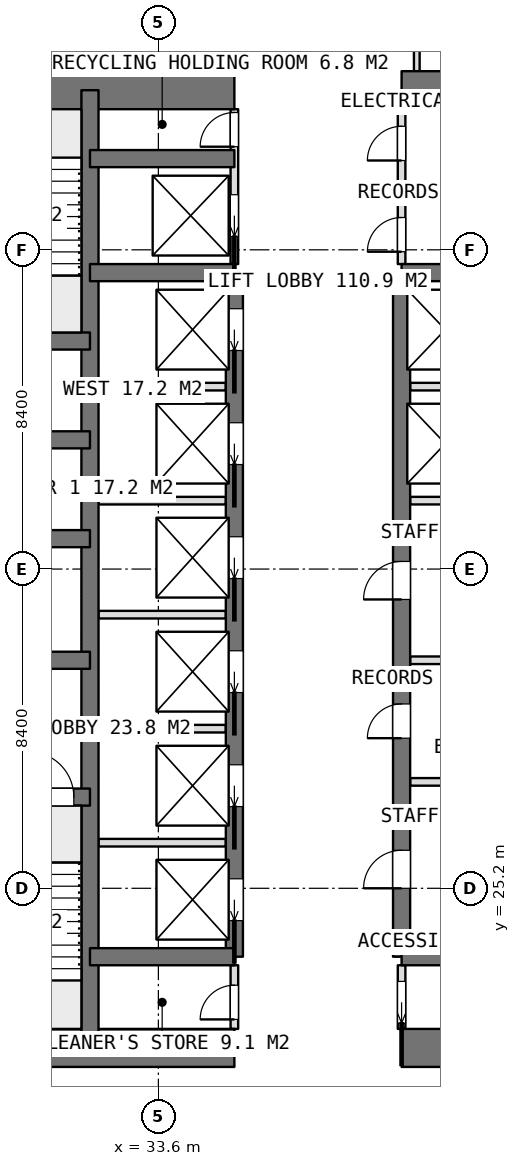
"""IFC4 building model, lengths in metres.
Left out: names, types, materials, properties, quantities, classifications, styles, units other than length and angle.
Written with IfcOpenShell. Run it as: python <this file> out.ifc"""

import sys

from ifc_helpers import new_model, si_unit, direction, frame, frame_2d, origin, place, context, subcontext, project, spatial, rectangle, extrude, element, fill, save


model = new_model("IFC4")
c1 = context("Model", 3, precision=1e-05, world=origin(), true_north=direction((0.0, 1.0)))
c2 = subcontext(c1, "Body", "Model", "MODEL_VIEW")
j1 = project(units=[si_unit("LENGTHUNIT", "METRE"), si_unit("PLANEANGLEUNIT", "RADIAN")], contexts=[c1])
p1 = place(None, origin())
s1 = spatial("IfcSite", under=j1, at=p1, CompositionType="ELEMENT")
p2 = place(p1, origin())
s2 = spatial("IfcBuilding", under=s1, at=p2, CompositionType="ELEMENT")
p3 = place(p2, frame((0.0, 0.0, 198.95)))
s3 = spatial("IfcBuildingStorey", under=s2, at=p3, CompositionType="ELEMENT", Elevation=198.95)
p4 = place(p3, frame((25.2, 21.0, 0.0), z_axis=(0.0, 0.0, 1.0), x_axis=(1.0, 0.0, 0.0)))
e1 = element("IfcWall", 1, at=p4, inside=s3, PredefinedType="SHEAR", context=c2, shape_type="SweptSolid", body=[
    extrude(rectangle(XDim=10.4, YDim=1.0, at=frame_2d((5.2, 0.0))), origin(), (0.0, 0.0, 1.0), 3.75),
])
p5 = place(p3, frame((40.0, 21.0, 0.0), z_axis=(0.0, 0.0, 1.0), x_axis=(1.0, 0.0, 0.0)))
e2 = element("IfcWall", 2, at=p5, inside=s3, PredefinedType="SHEAR", context=c2, shape_type="SweptSolid", body=[
    extrude(rectangle(XDim=10.4, YDim=1.0, at=frame_2d((5.2, 0.0))), origin(), (0.0, 0.0, 1.0), 3.75),
])
p6 = place(p3, frame((25.2, 46.2, 0.0), z_axis=(0.0, 0.0, 1.0), x_axis=(1.0, 0.0, 0.0)))
e3 = element("IfcWall", 3, at=p6, inside=s3, PredefinedType="SHEAR", context=c2, shape_type="SweptSolid", body=[
    extrude(rectangle(XDim=10.4, YDim=1.0, at=frame_2d((5.2, 0.0))), origin(), (0.0, 0.0, 1.0), 3.75),
])
p7 = place(p3, frame((40.0, 46.2, 0.0), z_axis=(0.0, 0.0, 1.0), x_axis=(1.0, 0.0, 0.0)))
e4 = element("IfcWall", 4, at=p7, inside=s3, PredefinedType="SHEAR", context=c2, shape_type="SweptSolid", body=[
    extrude(rectangle(XDim=10.4, YDim=1.0, at=frame_2d((5.2, 0.0))), origin(), (0.0, 0.0, 1.0), 3.75),
])
p8 = place(p3, frame((31.8, 21.0, 0.0), z_axis=(0.0, 0.0, 1.0), x_axis=(0.0, 1.0, 0.0)))
e5 = element("IfcWall", 5, at=p8, inside=s3, PredefinedType="SHEAR", context=c2, shape_type="SweptSolid", body=[
    extrude(rectangle(XDim=25.2, YDim=0.45, at=frame_2d((12.6, 0.0))), origin(), (0.0, 0.0, 1.0), 3.75),
])
p9 = place(p3, frame((35.6, 23.4, 0.0), z_axis=(0.0, 0.0, 1.0), x_axis=(0.0, 1.0, 0.0)))
e6 = element("IfcWall", 6, at=p9, inside=s3, PredefinedType="SHEAR", context=c2, shape_type="SweptSolid", body=[
    extrude(rectangle(XDim=18.0, YDim=0.45, at=frame_2d((9.0, 0.0))), origin(), (0.0, 0.0, 1.0), 3.75),
])
p10 = place(p9, frame((0.95, 0.0, 0.0)))
e7 = element("IfcOpeningElement", 7, at=p10, cuts=e6, PredefinedType="OPENING", context=c2, shape_type="SweptSolid", body=[
    extrude(rectangle(XDim=1.1, YDim=2.1, at=frame_2d((0.55, 1.05))), frame((0.0, 0.235, 0.0), z_axis=(0.0, -1.0, 0.0), x_axis=(1.0, 0.0, 0.0)), (0.0, 0.0, 1.0), 0.47),
])
p11 = place(p9, frame((3.95, 0.0, 0.0)))
e8 = element("IfcOpeningElement", 8, at=p11, cuts=e6, PredefinedType="OPENING", context=c2, shape_type="SweptSolid", body=[
    extrude(rectangle(XDim=1.1, YDim=2.1, at=frame_2d((0.55, 1.05))), frame((0.0, 0.235, 0.0), z_axis=(0.0, -1.0, 0.0), x_axis=(1.0, 0.0, 0.0)), (0.0, 0.0, 1.0), 0.47),
])
p12 = place(p9, frame((6.95, 0.0, 0.0)))
e9 = element("IfcOpeningElement", 9, at=p12, cuts=e6, PredefinedType="OPENING", context=c2, shape_type="SweptSolid", body=[
    extrude(rectangle(XDim=1.1, YDim=2.1, at=frame_2d((0.55, 1.05))), frame((0.0, 0.235, 0.0), z_axis=(0.0, -1.0, 0.0), x_axis=(1.0, 0.0, 0.0)), (0.0, 0.0, 1.0), 0.47),
])
p13 = place(p9, frame((9.95, 0.0, 0.0)))
e10 = element("IfcOpeningElement", 10, at=p13, cuts=e6, PredefinedType="OPENING", context=c2, shape_type="SweptSolid", body=[
    extrude(rectangle(XDim=1.1, YDim=2.1, at=frame_2d((0.55, 1.05))), frame((0.0, 0.235, 0.0), z_axis=(0.0, -1.0, 0.0), x_axis=(1.0, 0.0, 0.0)), (0.0, 0.0, 1.0), 0.47),
])
p14 = place(p9, frame((12.95, 0.0, 0.0)))
e11 = element("IfcOpeningElement", 11, at=p14, cuts=e6, PredefinedType="OPENING", context=c2, shape_type="SweptSolid", body=[
    extrude(rectangle(XDim=1.1, YDim=2.1, at=frame_2d((0.55, 1.05))), frame((0.0, 0.235, 0.0), z_axis=(0.0, -1.0, 0.0), x_axis=(1.0, 0.0, 0.0)), (0.0, 0.0, 1.0), 0.47),
])
p15 = place(p9, frame((15.95, 0.0, 0.0)))
e12 = element("IfcOpeningElement", 12, at=p15, cuts=e6, PredefinedType="OPENING", context=c2, shape_type="SweptSolid", body=[
    extrude(rectangle(XDim=1.1, YDim=2.1, at=frame_2d((0.55, 1.05))), frame((0.0, 0.235, 0.0), z_axis=(0.0, -1.0, 0.0), x_axis=(1.0, 0.0, 0.0)), (0.0, 0.0, 1.0), 0.47),
])
p16 = place(p3, frame((40.0, 23.4, 0.0), z_axis=(0.0, 0.0, 1.0), x_axis=(0.0, 1.0, 0.0)))
e13 = element("IfcWall", 13, at=p16, inside=s3, PredefinedType="SHEAR", context=c2, shape_type="SweptSolid", body=[
    extrude(rectangle(XDim=18.0, YDim=0.45, at=frame_2d((9.0, 0.0))), origin(), (0.0, 0.0, 1.0), 3.75),
])
p17 = place(p16, frame((1.8, 0.0, 0.0)))
e14 = element("IfcOpeningElement", 14, at=p17, cuts=e13, PredefinedType="OPENING", context=c2, shape_type="SweptSolid", body=[
    extrude(rectangle(XDim=1.0, YDim=2.1, at=frame_2d((0.5, 1.05))), frame((0.0, 0.235, 0.0), z_axis=(0.0, -1.0, 0.0), x_axis=(1.0, 0.0, 0.0)), (0.0, 0.0, 1.0), 0.47),
])
p18 = place(p16, frame((5.75, 0.0, 0.0)))
e15 = element("IfcOpeningElement", 15, at=p18, cuts=e13, PredefinedType="OPENING", context=c2, shape_type="SweptSolid", body=[
    extrude(rectangle(XDim=0.9, YDim=2.1, at=frame_2d((0.45, 1.05))), frame((0.0, 0.235, 0.0), z_axis=(0.0, -1.0, 0.0), x_axis=(1.0, 0.0, 0.0)), (0.0, 0.0, 1.0), 0.47),
])
p19 = place(p16, frame((9.4, 0.0, 0.0)))
e16 = element("IfcOpeningElement", 16, at=p19, cuts=e13, PredefinedType="OPENING", context=c2, shape_type="SweptSolid", body=[
    extrude(rectangle(XDim=1.0, YDim=2.1, at=frame_2d((0.5, 1.05))), frame((0.0, 0.235, 0.0), z_axis=(0.0, -1.0, 0.0), x_axis=(1.0, 0.0, 0.0)), (0.0, 0.0, 1.0), 0.47),
])
for number, where, z_axis, x_axis in (
    (17, (31.8, 23.4, 0.0), (0.0, 0.0, 1.0), (1.0, 0.0, 0.0)),
    (18, (31.8, 41.4, 0.0), (0.0, 0.0, 1.0), (1.0, 0.0, 0.0)),
    (19, (31.8, 44.4, 0.0), (0.0, 0.0, 1.0), (1.0, 0.0, 0.0)),
    (20, (40.0, 23.4, 0.0), (0.0, 0.0, 1.0), (1.0, 0.0, 0.0)),
    (21, (40.0, 41.4, 0.0), (0.0, 0.0, 1.0), (1.0, 0.0, 0.0)),
):
    element("IfcWall", number, at=place(p3, frame(where, z_axis=z_axis, x_axis=x_axis)), inside=s3, PredefinedType="SHEAR", context=c2, shape_type="SweptSolid", body=[
        extrude(rectangle(XDim=3.8, YDim=0.45, at=frame_2d((1.9, 0.0))), origin(), (0.0, 0.0, 1.0), 3.75),
    ])
p20 = place(p3, frame((25.2, 27.6, 0.0), z_axis=(0.0, 0.0, 1.0), x_axis=(1.0, 0.0, 0.0)))
e22 = element("IfcWall", 22, at=p20, inside=s3, PredefinedType="SHEAR", context=c2, shape_type="SweptSolid", body=[
    extrude(rectangle(XDim=6.6, YDim=0.45, at=frame_2d((3.3, 0.0))), origin(), (0.0, 0.0, 1.0), 3.75),
])
p21 = place(p20, frame((4.975, 0.0, 0.0)))
e23 = element("IfcOpeningElement", 23, at=p21, cuts=e22, PredefinedType="OPENING", context=c2, shape_type="SweptSolid", body=[
    extrude(rectangle(XDim=1.2, YDim=2.1, at=frame_2d((0.6, 1.05))), frame((0.0, 0.235, 0.0), z_axis=(0.0, -1.0, 0.0), x_axis=(1.0, 0.0, 0.0)), (0.0, 0.0, 1.0), 0.47),
])
p22 = place(p3, frame((25.2, 31.2, 0.0), z_axis=(0.0, 0.0, 1.0), x_axis=(1.0, 0.0, 0.0)))
e24 = element("IfcWall", 24, at=p22, inside=s3, PredefinedType="SHEAR", context=c2, shape_type="SweptSolid", body=[
    extrude(rectangle(XDim=6.6, YDim=0.45, at=frame_2d((3.3, 0.0))), origin(), (0.0, 0.0, 1.0), 3.75),
])
p23 = place(p22, frame((2.65, 0.0, 0.0)))
e25 = element("IfcOpeningElement", 25, at=p23, cuts=e24, PredefinedType="OPENING", context=c2, shape_type="SweptSolid", body=[
    extrude(rectangle(XDim=1.3, YDim=2.1, at=frame_2d((0.65, 1.05))), frame((0.0, 0.235, 0.0), z_axis=(0.0, -1.0, 0.0), x_axis=(1.0, 0.0, 0.0)), (0.0, 0.0, 1.0), 0.47),
])
for number, where, z_axis, x_axis in (
    (26, (25.2, 34.4, 0.0), (0.0, 0.0, 1.0), (1.0, 0.0, 0.0)),
    (27, (25.2, 37.0, 0.0), (0.0, 0.0, 1.0), (1.0, 0.0, 0.0)),
    (28, (25.2, 39.6, 0.0), (0.0, 0.0, 1.0), (1.0, 0.0, 0.0)),
):
    element("IfcWall", number, at=place(p3, frame(where, z_axis=z_axis, x_axis=x_axis)), inside=s3, PredefinedType="SHEAR", context=c2, shape_type="SweptSolid", body=[
        extrude(rectangle(XDim=6.6, YDim=0.45, at=frame_2d((3.3, 0.0))), origin(), (0.0, 0.0, 1.0), 3.75),
    ])
for number, where, z_axis, x_axis in (
    (29, (32.025, 26.4, 0.0), (0.0, 0.0, 1.0), (1.0, 0.0, 0.0)),
    (30, (32.025, 29.4, 0.0), (0.0, 0.0, 1.0), (1.0, 0.0, 0.0)),
    (31, (32.025, 32.4, 0.0), (0.0, 0.0, 1.0), (1.0, 0.0, 0.0)),
    (32, (32.025, 35.4, 0.0), (0.0, 0.0, 1.0), (1.0, 0.0, 0.0)),
    (33, (32.025, 38.4, 0.0), (0.0, 0.0, 1.0), (1.0, 0.0, 0.0)),
):
    element("IfcWall", number, at=place(p3, frame(where, z_axis=z_axis, x_axis=x_axis)), inside=s3, PredefinedType="PARTITIONING", context=c2, shape_type="SweptSolid", body=[
        extrude(rectangle(XDim=3.35, YDim=0.2, at=frame_2d((1.675, 0.0))), origin(), (0.0, 0.0, 1.0), 3.5),
    ])
for number, where, z_axis, x_axis in (
    (34, (40.225, 35.4, 0.0), (0.0, 0.0, 1.0), (1.0, 0.0, 0.0)),
    (35, (40.225, 38.4, 0.0), (0.0, 0.0, 1.0), (1.0, 0.0, 0.0)),
):
    element("IfcWall", number, at=place(p3, frame(where, z_axis=z_axis, x_axis=x_axis)), inside=s3, PredefinedType="PARTITIONING", context=c2, shape_type="SweptSolid", body=[
        extrude(rectangle(XDim=3.35, YDim=0.2, at=frame_2d((1.675, 0.0))), origin(), (0.0, 0.0, 1.0), 3.5),
    ])
p24 = place(p3, frame((40.0, 21.5, 0.0), z_axis=(0.0, 0.0, 1.0), x_axis=(0.0, 1.0, 0.0)))
e36 = element("IfcWall", 36, at=p24, inside=s3, PredefinedType="PARTITIONING", context=c2, shape_type="SweptSolid", body=[
    extrude(rectangle(XDim=1.675, YDim=0.2, at=frame_2d((0.837, 0.0))), origin(), (0.0, 0.0, 1.0), 3.5),
])
p25 = place(p24, frame((0.15, 0.0, 0.0)))
e37 = element("IfcOpeningElement", 37, at=p25, cuts=e36, PredefinedType="OPENING", context=c2, shape_type="SweptSolid", body=[
    extrude(rectangle(XDim=1.1, YDim=2.1, at=frame_2d((0.55, 1.05))), frame((0.0, 0.11, 0.0), z_axis=(0.0, -1.0, 0.0), x_axis=(1.0, 0.0, 0.0)), (0.0, 0.0, 1.0), 0.22),
])
p26 = place(p3, frame((40.0, 41.625, 0.0), z_axis=(0.0, 0.0, 1.0), x_axis=(0.0, 1.0, 0.0)))
e38 = element("IfcWall", 38, at=p26, inside=s3, PredefinedType="PARTITIONING", context=c2, shape_type="SweptSolid", body=[
    extrude(rectangle(XDim=4.075, YDim=0.2, at=frame_2d((2.038, 0.0))), origin(), (0.0, 0.0, 1.0), 3.5),
])
p27 = place(p26, frame((2.725, 0.0, 0.0)))
e39 = element("IfcOpeningElement", 39, at=p27, cuts=e38, PredefinedType="OPENING", context=c2, shape_type="SweptSolid", body=[
    extrude(rectangle(XDim=0.9, YDim=2.1, at=frame_2d((0.45, 1.05))), frame((0.0, 0.11, 0.0), z_axis=(0.0, -1.0, 0.0), x_axis=(1.0, 0.0, 0.0)), (0.0, 0.0, 1.0), 0.22),
])
p28 = place(p26, frame((0.325, 0.0, 0.0)))
e40 = element("IfcOpeningElement", 40, at=p28, cuts=e38, PredefinedType="OPENING", context=c2, shape_type="SweptSolid", body=[
    extrude(rectangle(XDim=0.9, YDim=2.1, at=frame_2d((0.45, 1.05))), frame((0.0, 0.11, 0.0), z_axis=(0.0, -1.0, 0.0), x_axis=(1.0, 0.0, 0.0)), (0.0, 0.0, 1.0), 0.22),
])
p29 = place(p3, frame((35.6, 41.625, 0.0), z_axis=(0.0, 0.0, 1.0), x_axis=(0.0, 1.0, 0.0)))
e41 = element("IfcWall", 41, at=p29, inside=s3, PredefinedType="PARTITIONING", context=c2, shape_type="SweptSolid", body=[
    extrude(rectangle(XDim=4.075, YDim=0.2, at=frame_2d((2.038, 0.0))), origin(), (0.0, 0.0, 1.0), 3.5),
])
p30 = place(p29, frame((3.088, 0.0, 0.0)))
e42 = element("IfcOpeningElement", 42, at=p30, cuts=e41, PredefinedType="OPENING", context=c2, shape_type="SweptSolid", body=[
    extrude(rectangle(XDim=0.9, YDim=2.1, at=frame_2d((0.45, 1.05))), frame((0.0, 0.11, 0.0), z_axis=(0.0, -1.0, 0.0), x_axis=(1.0, 0.0, 0.0)), (0.0, 0.0, 1.0), 0.22),
])
p31 = place(p29, frame((0.725, 0.0, 0.0)))
e43 = element("IfcOpeningElement", 43, at=p31, cuts=e41, PredefinedType="OPENING", context=c2, shape_type="SweptSolid", body=[
    extrude(rectangle(XDim=1.1, YDim=2.1, at=frame_2d((0.55, 1.05))), frame((0.0, 0.11, 0.0), z_axis=(0.0, -1.0, 0.0), x_axis=(1.0, 0.0, 0.0)), (0.0, 0.0, 1.0), 0.22),
])
p32 = place(p3, frame((35.6, 21.5, 0.0), z_axis=(0.0, 0.0, 1.0), x_axis=(0.0, 1.0, 0.0)))
e44 = element("IfcWall", 44, at=p32, inside=s3, PredefinedType="PARTITIONING", context=c2, shape_type="SweptSolid", body=[
    extrude(rectangle(XDim=1.675, YDim=0.2, at=frame_2d((0.837, 0.0))), origin(), (0.0, 0.0, 1.0), 3.5),
])
p33 = place(p32, frame((0.25, 0.0, 0.0)))
e45 = element("IfcOpeningElement", 45, at=p33, cuts=e44, PredefinedType="OPENING", context=c2, shape_type="SweptSolid", body=[
    extrude(rectangle(XDim=0.9, YDim=2.1, at=frame_2d((0.45, 1.05))), frame((0.0, 0.11, 0.0), z_axis=(0.0, -1.0, 0.0), x_axis=(1.0, 0.0, 0.0)), (0.0, 0.0, 1.0), 0.22),
])
for number, where, z_axis, x_axis in (
    (46, (40.225, 28.0, 0.0), (0.0, 0.0, 1.0), (1.0, 0.0, 0.0)),
    (47, (40.225, 31.2, 0.0), (0.0, 0.0, 1.0), (1.0, 0.0, 0.0)),
):
    element("IfcWall", number, at=place(p3, frame(where, z_axis=z_axis, x_axis=x_axis)), inside=s3, PredefinedType="PARTITIONING", context=c2, shape_type="SweptSolid", body=[
        extrude(rectangle(XDim=3.35, YDim=0.2, at=frame_2d((1.675, 0.0))), origin(), (0.0, 0.0, 1.0), 3.5),
    ])
p34 = place(p3, frame((40.0, 43.4, 0.0), z_axis=(0.0, 0.0, 1.0), x_axis=(1.0, 0.0, 0.0)))
e48 = element("IfcWall", 48, at=p34, inside=s3, PredefinedType="PARTITIONING", context=c2, shape_type="SweptSolid", body=[
    extrude(rectangle(XDim=3.575, YDim=0.2, at=frame_2d((1.788, 0.0))), origin(), (0.0, 0.0, 1.0), 3.5),
])
for number, where, z_axis, x_axis in (
    (49, (40.4, 46.7, 0.0), (0.0, 0.0, 1.0), (0.0, 1.0, 0.0)),
    (50, (35.2, 46.7, 0.0), (0.0, 0.0, 1.0), (0.0, 1.0, 0.0)),
):
    element("IfcWall", number, at=place(p3, frame(where, z_axis=z_axis, x_axis=x_axis)), inside=s3, PredefinedType="PARTITIONING", context=c2, shape_type="SweptSolid", body=[
        extrude(rectangle(XDim=2.625, YDim=0.15, at=frame_2d((1.312, 0.0))), origin(), (0.0, 0.0, 1.0), 3.5),
    ])
p35 = place(p25, origin())
e51 = element("IfcDoor", 51, at=p35, inside=s3, OperationType="SLIDING_TO_LEFT", PredefinedType="DOOR", context=c2, shape_type="SweptSolid", body=[
    extrude(rectangle(XDim=1.1, YDim=2.1, at=frame_2d((0.55, 1.05))), frame((0.0, 0.025, 0.0), z_axis=(0.0, -1.0, 0.0), x_axis=(1.0, 0.0, 0.0)), (0.0, 0.0, 1.0), 0.05),
])
fill(e37, e51)
p36 = place(p33, origin())
e52 = element("IfcDoor", 52, at=p36, inside=s3, OperationType="SINGLE_SWING_LEFT", PredefinedType="DOOR", context=c2, shape_type="SweptSolid", body=[
    extrude(rectangle(XDim=0.9, YDim=2.1, at=frame_2d((0.45, 1.05))), frame((0.0, 0.025, 0.0), z_axis=(0.0, -1.0, 0.0), x_axis=(1.0, 0.0, 0.0)), (0.0, 0.0, 1.0), 0.05),
])
fill(e45, e52)
p37 = place(p27, origin())
e53 = element("IfcDoor", 53, at=p37, inside=s3, OperationType="SINGLE_SWING_LEFT", PredefinedType="DOOR", context=c2, shape_type="SweptSolid", body=[
    extrude(rectangle(XDim=0.9, YDim=2.1, at=frame_2d((0.45, 1.05))), frame((0.0, 0.025, 0.0), z_axis=(0.0, -1.0, 0.0), x_axis=(1.0, 0.0, 0.0)), (0.0, 0.0, 1.0), 0.05),
])
fill(e39, e53)
p38 = place(p28, origin())
e54 = element("IfcDoor", 54, at=p38, inside=s3, OperationType="SINGLE_SWING_LEFT", PredefinedType="DOOR", context=c2, shape_type="SweptSolid", body=[
    extrude(rectangle(XDim=0.9, YDim=2.1, at=frame_2d((0.45, 1.05))), frame((0.0, 0.025, 0.0), z_axis=(0.0, -1.0, 0.0), x_axis=(1.0, 0.0, 0.0)), (0.0, 0.0, 1.0), 0.05),
])
fill(e40, e54)
p39 = place(p17, origin())
e55 = element("IfcDoor", 55, at=p39, inside=s3, OperationType="SINGLE_SWING_LEFT", PredefinedType="DOOR", context=c2, shape_type="SweptSolid", body=[
    extrude(rectangle(XDim=1.0, YDim=2.1, at=frame_2d((0.5, 1.05))), frame((0.0, 0.025, 0.0), z_axis=(0.0, -1.0, 0.0), x_axis=(1.0, 0.0, 0.0)), (0.0, 0.0, 1.0), 0.05),
])
fill(e14, e55)
p40 = place(p18, origin())
e56 = element("IfcDoor", 56, at=p40, inside=s3, OperationType="SINGLE_SWING_LEFT", PredefinedType="DOOR", context=c2, shape_type="SweptSolid", body=[
    extrude(rectangle(XDim=0.9, YDim=2.1, at=frame_2d((0.45, 1.05))), frame((0.0, 0.025, 0.0), z_axis=(0.0, -1.0, 0.0), x_axis=(1.0, 0.0, 0.0)), (0.0, 0.0, 1.0), 0.05),
])
fill(e15, e56)
p41 = place(p19, origin())
e57 = element("IfcDoor", 57, at=p41, inside=s3, OperationType="SINGLE_SWING_LEFT", PredefinedType="DOOR", context=c2, shape_type="SweptSolid", body=[
    extrude(rectangle(XDim=1.0, YDim=2.1, at=frame_2d((0.5, 1.05))), frame((0.0, 0.025, 0.0), z_axis=(0.0, -1.0, 0.0), x_axis=(1.0, 0.0, 0.0)), (0.0, 0.0, 1.0), 0.05),
])
fill(e16, e57)
p42 = place(p30, origin())
e58 = element("IfcDoor", 58, at=p42, inside=s3, OperationType="SINGLE_SWING_LEFT", PredefinedType="DOOR", context=c2, shape_type="SweptSolid", body=[
    extrude(rectangle(XDim=0.9, YDim=2.1, at=frame_2d((0.45, 1.05))), frame((0.0, 0.025, 0.0), z_axis=(0.0, -1.0, 0.0), x_axis=(1.0, 0.0, 0.0)), (0.0, 0.0, 1.0), 0.05),
])
fill(e42, e58)
p43 = place(p10, origin())
e59 = element("IfcDoor", 59, at=p43, inside=s3, OperationType="SLIDING_TO_LEFT", PredefinedType="USERDEFINED", context=c2, shape_type="SweptSolid", body=[
    extrude(rectangle(XDim=1.1, YDim=2.1, at=frame_2d((0.55, 1.05))), frame((0.0, 0.025, 0.0), z_axis=(0.0, -1.0, 0.0), x_axis=(1.0, 0.0, 0.0)), (0.0, 0.0, 1.0), 0.05),
])
fill(e7, e59)
p44 = place(p11, origin())
e60 = element("IfcDoor", 60, at=p44, inside=s3, OperationType="SLIDING_TO_LEFT", PredefinedType="USERDEFINED", context=c2, shape_type="SweptSolid", body=[
    extrude(rectangle(XDim=1.1, YDim=2.1, at=frame_2d((0.55, 1.05))), frame((0.0, 0.025, 0.0), z_axis=(0.0, -1.0, 0.0), x_axis=(1.0, 0.0, 0.0)), (0.0, 0.0, 1.0), 0.05),
])
fill(e8, e60)
p45 = place(p12, origin())
e61 = element("IfcDoor", 61, at=p45, inside=s3, OperationType="SLIDING_TO_LEFT", PredefinedType="USERDEFINED", context=c2, shape_type="SweptSolid", body=[
    extrude(rectangle(XDim=1.1, YDim=2.1, at=frame_2d((0.55, 1.05))), frame((0.0, 0.025, 0.0), z_axis=(0.0, -1.0, 0.0), x_axis=(1.0, 0.0, 0.0)), (0.0, 0.0, 1.0), 0.05),
])
fill(e9, e61)
p46 = place(p13, origin())
e62 = element("IfcDoor", 62, at=p46, inside=s3, OperationType="SLIDING_TO_LEFT", PredefinedType="USERDEFINED", context=c2, shape_type="SweptSolid", body=[
    extrude(rectangle(XDim=1.1, YDim=2.1, at=frame_2d((0.55, 1.05))), frame((0.0, 0.025, 0.0), z_axis=(0.0, -1.0, 0.0), x_axis=(1.0, 0.0, 0.0)), (0.0, 0.0, 1.0), 0.05),
])
fill(e10, e62)
p47 = place(p14, origin())
e63 = element("IfcDoor", 63, at=p47, inside=s3, OperationType="SLIDING_TO_LEFT", PredefinedType="USERDEFINED", context=c2, shape_type="SweptSolid", body=[
    extrude(rectangle(XDim=1.1, YDim=2.1, at=frame_2d((0.55, 1.05))), frame((0.0, 0.025, 0.0), z_axis=(0.0, -1.0, 0.0), x_axis=(1.0, 0.0, 0.0)), (0.0, 0.0, 1.0), 0.05),
])
fill(e11, e63)
p48 = place(p15, origin())
e64 = element("IfcDoor", 64, at=p48, inside=s3, OperationType="SLIDING_TO_LEFT", PredefinedType="USERDEFINED", context=c2, shape_type="SweptSolid", body=[
    extrude(rectangle(XDim=1.1, YDim=2.1, at=frame_2d((0.55, 1.05))), frame((0.0, 0.025, 0.0), z_axis=(0.0, -1.0, 0.0), x_axis=(1.0, 0.0, 0.0)), (0.0, 0.0, 1.0), 0.05),
])
fill(e12, e64)
p49 = place(p31, origin())
e65 = element("IfcDoor", 65, at=p49, inside=s3, OperationType="SLIDING_TO_LEFT", PredefinedType="USERDEFINED", context=c2, shape_type="SweptSolid", body=[
    extrude(rectangle(XDim=1.1, YDim=2.1, at=frame_2d((0.55, 1.05))), frame((0.0, 0.025, 0.0), z_axis=(0.0, -1.0, 0.0), x_axis=(1.0, 0.0, 0.0)), (0.0, 0.0, 1.0), 0.05),
])
fill(e43, e65)
p50 = place(p21, origin())
e66 = element("IfcDoor", 66, at=p50, inside=s3, OperationType="SINGLE_SWING_RIGHT", PredefinedType="DOOR", context=c2, shape_type="SweptSolid", body=[
    extrude(rectangle(XDim=1.2, YDim=2.1, at=frame_2d((0.6, 1.05))), frame((0.0, 0.025, 0.0), z_axis=(0.0, -1.0, 0.0), x_axis=(1.0, 0.0, 0.0)), (0.0, 0.0, 1.0), 0.05),
])
fill(e23, e66)
save(model, sys.argv[1])
